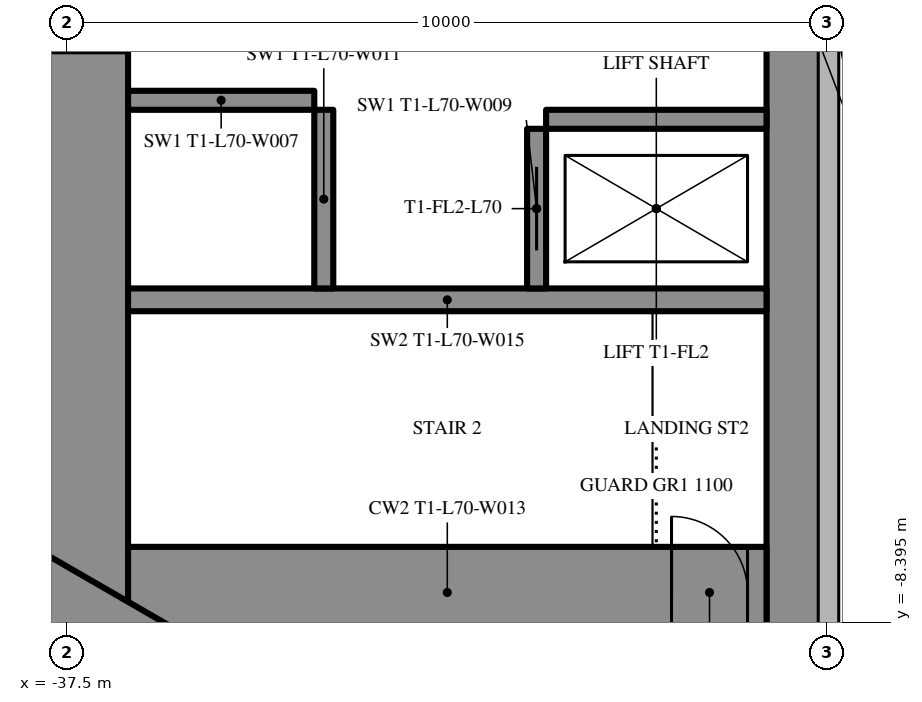
"""IFC4 building model, lengths in metres.
Left out: names, types, materials, properties, quantities, classifications, styles, units other than length and angle.
Written with IfcOpenShell. Run it as: python <this file> out.ifc"""

import sys

from ifc_helpers import new_model, si_unit, direction, frame, frame_2d, origin, place, context, subcontext, project, spatial, rectangle, extrude, element, fill, save


model = new_model("IFC4")
c1 = context("Model", 3, precision=1e-05, world=origin(), true_north=direction((0.0, 1.0)))
c2 = subcontext(c1, "Body", "Model", "MODEL_VIEW")
j1 = project(units=[si_unit("LENGTHUNIT", "METRE"), si_unit("PLANEANGLEUNIT", "RADIAN")], contexts=[c1])
p1 = place(None, origin())
s1 = spatial("IfcSite", under=j1, at=p1, CompositionType="ELEMENT")
p2 = place(p1, origin())
s2 = spatial("IfcBuilding", under=s1, at=p2, CompositionType="ELEMENT")
p3 = place(p2, frame((0.0, 0.0, 268.3)))
s3 = spatial("IfcBuildingStorey", under=s2, at=p3, CompositionType="ELEMENT", Elevation=268.3)
p4 = place(p3, frame((-27.9, 8.6, 0.0), z_axis=(0.0, 0.0, 1.0), x_axis=(0.0, -1.0, 0.0)))
e1 = element("IfcWall", 1, at=p4, inside=s3, PredefinedType="SHEAR", context=c2, shape_type="SweptSolid", body=[
    extrude(rectangle(XDim=17.2, YDim=0.8, at=frame_2d((8.6, 0.0))), origin(), (0.0, 0.0, 1.0), 5.0),
])
p5 = place(p4, frame((6.95, 0.0, 0.0)))
e2 = element("IfcOpeningElement", 2, at=p5, cuts=e1, PredefinedType="OPENING", context=c2, shape_type="SweptSolid", body=[
    extrude(rectangle(XDim=0.9, YDim=2.2, at=frame_2d((0.45, 1.1))), frame((0.0, 0.41, 0.0), z_axis=(0.0, -1.0, 0.0), x_axis=(1.0, 0.0, 0.0)), (0.0, 0.0, 1.0), 0.82),
])
p6 = place(p3, frame((-37.3, 8.6, 0.0), z_axis=(0.0, 0.0, 1.0), x_axis=(0.0, -1.0, 0.0)))
e3 = element("IfcWall", 3, at=p6, inside=s3, PredefinedType="SHEAR", context=c2, shape_type="SweptSolid", body=[
    extrude(rectangle(XDim=17.2, YDim=1.2, at=frame_2d((8.6, 0.0))), origin(), (0.0, 0.0, 1.0), 5.0),
])
p7 = place(p6, frame((7.7, 0.0, 0.0)))
e4 = element("IfcOpeningElement", 4, at=p7, cuts=e3, PredefinedType="OPENING", context=c2, shape_type="SweptSolid", body=[
    extrude(rectangle(XDim=1.8, YDim=2.2, at=frame_2d((0.9, 1.1))), frame((0.0, 0.61, 0.0), z_axis=(0.0, -1.0, 0.0), x_axis=(1.0, 0.0, 0.0)), (0.0, 0.0, 1.0), 1.22),
])
p8 = place(p3, frame((-28.3, -8.0, 0.0), z_axis=(0.0, 0.0, 1.0), x_axis=(-1.0, 0.0, 0.0)))
e5 = element("IfcWall", 5, at=p8, inside=s3, PredefinedType="SHEAR", context=c2, shape_type="SweptSolid", body=[
    extrude(rectangle(XDim=8.4, YDim=1.2, at=frame_2d((4.2, 0.0))), origin(), (0.0, 0.0, 1.0), 5.0),
])
p9 = place(p8, frame((0.25, 0.0, 0.0)))
e6 = element("IfcOpeningElement", 6, at=p9, cuts=e5, PredefinedType="OPENING", context=c2, shape_type="SweptSolid", body=[
    extrude(rectangle(XDim=1.0, YDim=2.2, at=frame_2d((0.5, 1.1))), frame((0.0, 0.61, 0.0), z_axis=(0.0, -1.0, 0.0), x_axis=(1.0, 0.0, 0.0)), (0.0, 0.0, 1.0), 1.22),
])
p10 = place(p3, frame((-28.3, -4.15, 0.0), z_axis=(0.0, 0.0, 1.0), x_axis=(-1.0, 0.0, 0.0)))
e7 = element("IfcWall", 7, at=p10, inside=s3, PredefinedType="SHEAR", context=c2, shape_type="SweptSolid", body=[
    extrude(rectangle(XDim=8.4, YDim=0.3, at=frame_2d((4.2, 0.0))), origin(), (0.0, 0.0, 1.0), 5.0),
])
p11 = place(p3, frame((-31.325, -1.9, 0.0), z_axis=(0.0, 0.0, 1.0), x_axis=(0.0, -1.0, 0.0)))
e8 = element("IfcWall", 8, at=p11, inside=s3, PredefinedType="SHEAR", context=c2, shape_type="SweptSolid", body=[
    extrude(rectangle(XDim=2.1, YDim=0.25, at=frame_2d((1.05, 0.0))), origin(), (0.0, 0.0, 1.0), 5.0),
])
p12 = place(p11, frame((0.5, 0.0, 0.0)))
e9 = element("IfcOpeningElement", 9, at=p12, cuts=e8, PredefinedType="OPENING", context=c2, shape_type="SweptSolid", body=[
    extrude(rectangle(XDim=1.1, YDim=2.2, at=frame_2d((0.55, 1.1))), frame((0.0, 0.135, 0.0), z_axis=(0.0, -1.0, 0.0), x_axis=(1.0, 0.0, 0.0)), (0.0, 0.0, 1.0), 0.27),
])
p13 = place(p3, frame((-34.125, -1.65, 0.0), z_axis=(0.0, 0.0, 1.0), x_axis=(0.0, -1.0, 0.0)))
e10 = element("IfcWall", 10, at=p13, inside=s3, PredefinedType="SHEAR", context=c2, shape_type="SweptSolid", body=[
    extrude(rectangle(XDim=2.35, YDim=0.25, at=frame_2d((1.175, 0.0))), origin(), (0.0, 0.0, 1.0), 5.0),
])
p14 = place(p3, frame((-28.3, -1.775, 0.0), z_axis=(0.0, 0.0, 1.0), x_axis=(-1.0, 0.0, 0.0)))
e11 = element("IfcWall", 11, at=p14, inside=s3, PredefinedType="SHEAR", context=c2, shape_type="SweptSolid", body=[
    extrude(rectangle(XDim=2.9, YDim=0.25, at=frame_2d((1.45, 0.0))), origin(), (0.0, 0.0, 1.0), 5.0),
])
p15 = place(p3, frame((-34.25, -1.525, 0.0), z_axis=(0.0, 0.0, 1.0), x_axis=(-1.0, 0.0, 0.0)))
e12 = element("IfcWall", 12, at=p15, inside=s3, PredefinedType="SHEAR", context=c2, shape_type="SweptSolid", body=[
    extrude(rectangle(XDim=2.45, YDim=0.25, at=frame_2d((1.225, 0.0))), origin(), (0.0, 0.0, 1.0), 5.0),
])
p16 = place(p3, frame((-27.2, -14.3, 0.0), z_axis=(0.0, 0.0, 1.0), x_axis=(-0.866024021859, 0.500002393557, 0.0)))
e13 = element("IfcWall", 13, at=p16, inside=s3, PredefinedType="SHEAR", context=c2, shape_type="SweptSolid", body=[
    extrude(rectangle(XDim=27.907, YDim=1.2, at=frame_2d((13.954, 0.0))), origin(), (0.0, 0.0, 1.0), 5.0),
])
p17 = place(p16, frame((4.6, 0.0, 0.0)))
e14 = element("IfcOpeningElement", 14, at=p17, cuts=e13, PredefinedType="OPENING", context=c2, shape_type="SweptSolid", body=[
    extrude(rectangle(XDim=1.0, YDim=2.2, at=frame_2d((0.5, 1.1))), frame((0.0, 0.61, 0.0), z_axis=(0.0, -1.0, 0.0), x_axis=(1.0, 0.0, 0.0)), (0.0, 0.0, 1.0), 1.22),
])
p18 = place(p16, frame((13.395, 0.0, 0.0)))
e15 = element("IfcOpeningElement", 15, at=p18, cuts=e13, PredefinedType="OPENING", context=c2, shape_type="SweptSolid", body=[
    extrude(rectangle(XDim=1.8, YDim=2.2, at=frame_2d((0.9, 1.1))), frame((0.0, 0.61, 0.0), z_axis=(0.0, -1.0, 0.0), x_axis=(1.0, 0.0, 0.0)), (0.0, 0.0, 1.0), 1.22),
])
p19 = place(p3, frame((-28.737, -16.068, 0.0), z_axis=(0.0, 0.0, 1.0), x_axis=(-0.866026220747, 0.499998584977, 0.0)))
e16 = element("IfcWall", 16, at=p19, inside=s3, PredefinedType="PARTITIONING", context=c2, shape_type="SweptSolid", body=[
    extrude(rectangle(XDim=32.017, YDim=0.2, at=frame_2d((16.008, 0.0))), origin(), (0.0, 0.0, 1.0), 4.7),
])
p20 = place(p19, frame((27.066, 0.0, 0.0)))
e17 = element("IfcOpeningElement", 17, at=p20, cuts=e16, PredefinedType="OPENING", context=c2, shape_type="SweptSolid", body=[
    extrude(rectangle(XDim=2.0, YDim=2.4, at=frame_2d((1.0, 1.2))), frame((0.0, 0.11, 0.0), z_axis=(0.0, -1.0, 0.0), x_axis=(1.0, 0.0, 0.0)), (0.0, 0.0, 1.0), 0.22),
])
p21 = place(p19, frame((21.266, 0.0, 0.0)))
e18 = element("IfcOpeningElement", 18, at=p21, cuts=e16, PredefinedType="OPENING", context=c2, shape_type="SweptSolid", body=[
    extrude(rectangle(XDim=2.0, YDim=2.4, at=frame_2d((1.0, 1.2))), frame((0.0, 0.11, 0.0), z_axis=(0.0, -1.0, 0.0), x_axis=(1.0, 0.0, 0.0)), (0.0, 0.0, 1.0), 0.22),
])
p22 = place(p19, frame((17.117, 0.0, 0.0)))
e19 = element("IfcOpeningElement", 19, at=p22, cuts=e16, PredefinedType="OPENING", context=c2, shape_type="SweptSolid", body=[
    extrude(rectangle(XDim=2.0, YDim=2.4, at=frame_2d((1.0, 1.2))), frame((0.0, 0.11, 0.0), z_axis=(0.0, -1.0, 0.0), x_axis=(1.0, 0.0, 0.0)), (0.0, 0.0, 1.0), 0.22),
])
p23 = place(p19, frame((7.134, 0.0, 0.0)))
e20 = element("IfcOpeningElement", 20, at=p23, cuts=e16, PredefinedType="OPENING", context=c2, shape_type="SweptSolid", body=[
    extrude(rectangle(XDim=2.0, YDim=2.4, at=frame_2d((1.0, 1.2))), frame((0.0, 0.11, 0.0), z_axis=(0.0, -1.0, 0.0), x_axis=(1.0, 0.0, 0.0)), (0.0, 0.0, 1.0), 0.22),
])
p24 = place(p9, origin())
e21 = element("IfcDoor", 21, at=p24, inside=s3, OperationType="SINGLE_SWING_RIGHT", PredefinedType="DOOR", context=c2, shape_type="SweptSolid", body=[
    extrude(rectangle(XDim=1.0, YDim=2.2, at=frame_2d((0.5, 1.1))), frame((0.0, 0.025, 0.0), z_axis=(0.0, -1.0, 0.0), x_axis=(1.0, 0.0, 0.0)), (0.0, 0.0, 1.0), 0.05),
])
fill(e6, e21)
p25 = place(p12, origin())
e22 = element("IfcDoor", 22, at=p25, inside=s3, OperationType="SLIDING_TO_LEFT", PredefinedType="USERDEFINED", context=c2, shape_type="SweptSolid", body=[
    extrude(rectangle(XDim=1.1, YDim=2.2, at=frame_2d((0.55, 1.1))), frame((0.0, 0.025, 0.0), z_axis=(0.0, -1.0, 0.0), x_axis=(1.0, 0.0, 0.0)), (0.0, 0.0, 1.0), 0.05),
])
fill(e9, e22)
save(model, sys.argv[1])
